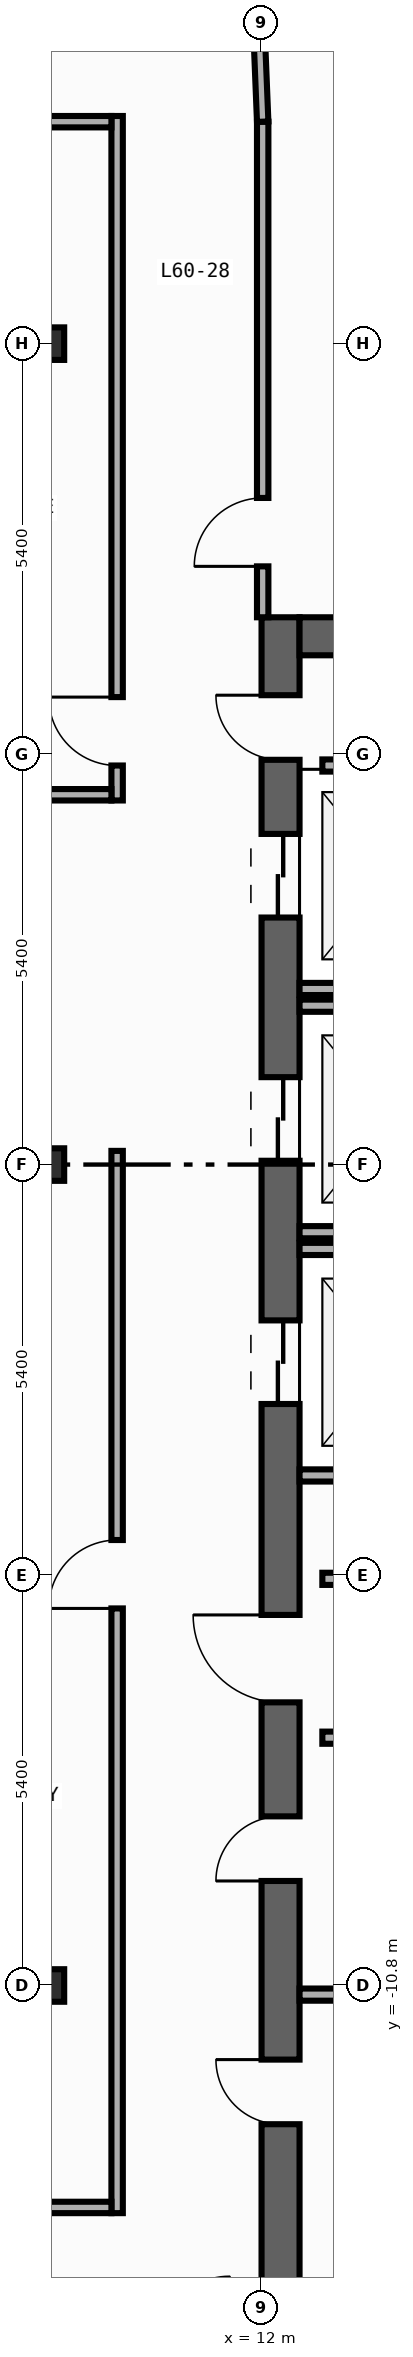
"""IFC4 building model, lengths in metres.
Left out: names, types, materials, properties, quantities, classifications, styles, units other than length and angle.
Written with IfcOpenShell. Run it as: python <this file> out.ifc"""

import sys

from ifc_helpers import new_model, si_unit, direction, frame, frame_2d, origin, origin_2d, place, context, subcontext, project, spatial, rectangle, i_section, extrude, element, fill, save


model = new_model("IFC4")
c1 = context("Model", 3, precision=1e-05, world=origin(), true_north=direction((0.0, 1.0)))
c2 = subcontext(c1, "Body", "Model", "MODEL_VIEW")
j1 = project(units=[si_unit("LENGTHUNIT", "METRE"), si_unit("PLANEANGLEUNIT", "RADIAN")], contexts=[c1])
p1 = place(None, origin())
s1 = spatial("IfcSite", under=j1, at=p1, CompositionType="ELEMENT")
p2 = place(p1, origin())
s2 = spatial("IfcBuilding", under=s1, at=p2, CompositionType="ELEMENT")
p3 = place(p2, frame((0.0, 0.0, 254.8)))
s3 = spatial("IfcBuildingStorey", under=s2, at=p3, CompositionType="ELEMENT", Elevation=254.8)
p4 = place(p3, frame((12.25, -19.8, 0.0), z_axis=(0.0, 0.0, 1.0), x_axis=(0.0, 1.0, 0.0)))
e1 = element("IfcWall", 1, at=p4, inside=s3, PredefinedType="SHEAR", context=c2, shape_type="SweptSolid", body=[
    extrude(rectangle(XDim=27.0, YDim=0.5, at=frame_2d((13.5, 0.0))), origin(), (0.0, 0.0, 1.0), 3.34),
])
p5 = place(p4, frame((23.05, 0.0, 0.0)))
e2 = element("IfcOpeningElement", 2, at=p5, cuts=e1, PredefinedType="OPENING", context=c2, shape_type="SweptSolid", body=[
    extrude(rectangle(XDim=1.1, YDim=2.2, at=frame_2d((0.55, 1.1))), frame((0.0, 0.26, 0.0), z_axis=(0.0, -1.0, 0.0), x_axis=(1.0, 0.0, 0.0)), (0.0, 0.0, 1.0), 0.52),
])
p6 = place(p4, frame((19.85, 0.0, 0.0)))
e3 = element("IfcOpeningElement", 3, at=p6, cuts=e1, PredefinedType="OPENING", context=c2, shape_type="SweptSolid", body=[
    extrude(rectangle(XDim=1.1, YDim=2.2, at=frame_2d((0.55, 1.1))), frame((0.0, 0.26, 0.0), z_axis=(0.0, -1.0, 0.0), x_axis=(1.0, 0.0, 0.0)), (0.0, 0.0, 1.0), 0.52),
])
p7 = place(p4, frame((16.65, 0.0, 0.0)))
e4 = element("IfcOpeningElement", 4, at=p7, cuts=e1, PredefinedType="OPENING", context=c2, shape_type="SweptSolid", body=[
    extrude(rectangle(XDim=1.1, YDim=2.2, at=frame_2d((0.55, 1.1))), frame((0.0, 0.26, 0.0), z_axis=(0.0, -1.0, 0.0), x_axis=(1.0, 0.0, 0.0)), (0.0, 0.0, 1.0), 0.52),
])
p8 = place(p4, frame((7.175, 0.0, 0.0)))
e5 = element("IfcOpeningElement", 5, at=p8, cuts=e1, PredefinedType="OPENING", context=c2, shape_type="SweptSolid", body=[
    extrude(rectangle(XDim=0.85, YDim=2.1, at=frame_2d((0.425, 1.05))), frame((0.0, 0.26, 0.0), z_axis=(0.0, -1.0, 0.0), x_axis=(1.0, 0.0, 0.0)), (0.0, 0.0, 1.0), 0.52),
])
p9 = place(p4, frame((10.375, 0.0, 0.0)))
e6 = element("IfcOpeningElement", 6, at=p9, cuts=e1, PredefinedType="OPENING", context=c2, shape_type="SweptSolid", body=[
    extrude(rectangle(XDim=0.85, YDim=2.1, at=frame_2d((0.425, 1.05))), frame((0.0, 0.26, 0.0), z_axis=(0.0, -1.0, 0.0), x_axis=(1.0, 0.0, 0.0)), (0.0, 0.0, 1.0), 0.52),
])
p10 = place(p4, frame((12.725, 0.0, 0.0)))
e7 = element("IfcOpeningElement", 7, at=p10, cuts=e1, PredefinedType="OPENING", context=c2, shape_type="SweptSolid", body=[
    extrude(rectangle(XDim=1.15, YDim=2.2, at=frame_2d((0.575, 1.1))), frame((0.0, 0.26, 0.0), z_axis=(0.0, -1.0, 0.0), x_axis=(1.0, 0.0, 0.0)), (0.0, 0.0, 1.0), 0.52),
])
p11 = place(p4, frame((25.125, 0.0, 0.0)))
e8 = element("IfcOpeningElement", 8, at=p11, cuts=e1, PredefinedType="OPENING", context=c2, shape_type="SweptSolid", body=[
    extrude(rectangle(XDim=0.85, YDim=2.1, at=frame_2d((0.425, 1.05))), frame((0.0, 0.26, 0.0), z_axis=(0.0, -1.0, 0.0), x_axis=(1.0, 0.0, 0.0)), (0.0, 0.0, 1.0), 0.52),
])
p12 = place(p3, frame((12.5, 6.95, 0.0), z_axis=(0.0, 0.0, 1.0), x_axis=(1.0, 0.0, 0.0)))
e9 = element("IfcWall", 9, at=p12, inside=s3, PredefinedType="SHEAR", context=c2, shape_type="SweptSolid", body=[
    extrude(rectangle(XDim=7.4, YDim=0.5, at=frame_2d((3.7, 0.0))), origin(), (0.0, 0.0, 1.0), 3.34),
])
for number, where, z_axis, x_axis in (
    (10, (9.2, -10.8, 0.0), (0.0, 0.0, 1.0), (1.0, 0.0, 0.0)),
    (11, (9.2, 0.0, 0.0), (0.0, 0.0, 1.0), (1.0, 0.0, 0.0)),
    (12, (9.2, 10.8, 0.0), (0.0, 0.0, 1.0), (1.0, 0.0, 0.0)),
):
    element("IfcColumn", number, at=place(p3, frame(where, z_axis=z_axis, x_axis=x_axis)), inside=s3, PredefinedType="COLUMN", context=c2, shape_type="SweptSolid", body=[
        extrude(i_section(OverallWidth=0.407, OverallDepth=0.428, WebThickness=0.02, FlangeThickness=0.035, FilletRadius=0.022, at=origin_2d()), origin(), (0.0, 0.0, 1.0), 3.6),
    ])
for number, where, z_axis, x_axis in (
    (13, (12.5, 2.31, 0.0), (0.0, 0.0, 1.0), (1.0, 0.0, 0.0)),
    (14, (12.5, -0.89, 0.0), (0.0, 0.0, 1.0), (1.0, 0.0, 0.0)),
    (15, (12.5, 2.09, 0.0), (0.0, 0.0, 1.0), (1.0, 0.0, 0.0)),
    (16, (12.5, -4.09, 0.0), (0.0, 0.0, 1.0), (1.0, 0.0, 0.0)),
    (17, (12.5, -1.11, 0.0), (0.0, 0.0, 1.0), (1.0, 0.0, 0.0)),
):
    element("IfcWall", number, at=place(p3, frame(where, z_axis=z_axis, x_axis=x_axis)), inside=s3, PredefinedType="STANDARD", context=c2, shape_type="SweptSolid", body=[
        extrude(rectangle(XDim=2.49, YDim=0.16, at=frame_2d((1.245, 0.0))), origin(), (0.0, 0.0, 1.0), 3.34),
    ])
for number, where, z_axis, x_axis in (
    (18, (12.8, -5.45, 0.0), (0.0, 0.0, 1.0), (1.0, 0.0, 0.0)),
    (19, (12.8, -7.54, 0.0), (0.0, 0.0, 1.0), (1.0, 0.0, 0.0)),
    (20, (12.8, 5.25, 0.0), (0.0, 0.0, 1.0), (1.0, 0.0, 0.0)),
):
    element("IfcWall", number, at=place(p3, frame(where, z_axis=z_axis, x_axis=x_axis)), inside=s3, PredefinedType="STANDARD", context=c2, shape_type="SweptSolid", body=[
        extrude(rectangle(XDim=2.6, YDim=0.16, at=frame_2d((1.3, 0.0))), origin(), (0.0, 0.0, 1.0), 3.34),
    ])
p13 = place(p3, frame((12.5, -10.92, 0.0), z_axis=(0.0, 0.0, 1.0), x_axis=(1.0, 0.0, 0.0)))
e21 = element("IfcWall", 21, at=p13, inside=s3, PredefinedType="PARTITIONING", context=c2, shape_type="SweptSolid", body=[
    extrude(rectangle(XDim=2.9, YDim=0.16, at=frame_2d((1.45, 0.0))), origin(), (0.0, 0.0, 1.0), 2.44),
])
p14 = place(p3, frame((12.015, 7.2, 0.0), z_axis=(0.0, 0.0, 1.0), x_axis=(0.0, 1.0, 0.0)))
e22 = element("IfcWall", 22, at=p14, inside=s3, PredefinedType="PARTITIONING", context=c2, shape_type="SweptSolid", body=[
    extrude(rectangle(XDim=6.52, YDim=0.15, at=frame_2d((3.26, 0.0))), origin(), (0.0, 0.0, 1.0), 3.34),
])
p15 = place(p14, frame((0.67, 0.0, 0.0)))
e23 = element("IfcOpeningElement", 23, at=p15, cuts=e22, PredefinedType="OPENING", context=c2, shape_type="SweptSolid", body=[
    extrude(rectangle(XDim=0.9, YDim=2.15, at=frame_2d((0.45, 1.075))), frame((0.0, 0.085, 0.0), z_axis=(0.0, -1.0, 0.0), x_axis=(1.0, 0.0, 0.0)), (0.0, 0.0, 1.0), 0.17),
])
p16 = place(p3, frame((10.1, 4.79, 0.0), z_axis=(0.0, 0.0, 1.0), x_axis=(0.0, 1.0, 0.0)))
e24 = element("IfcWall", 24, at=p16, inside=s3, PredefinedType="PARTITIONING", context=c2, shape_type="SweptSolid", body=[
    extrude(rectangle(XDim=9.005, YDim=0.15, at=frame_2d((4.502, 0.0))), origin(), (0.0, 0.0, 1.0), 3.34),
])
p17 = place(p16, frame((0.46, 0.0, 0.0)))
e25 = element("IfcOpeningElement", 25, at=p17, cuts=e24, PredefinedType="OPENING", context=c2, shape_type="SweptSolid", body=[
    extrude(rectangle(XDim=0.9, YDim=2.15, at=frame_2d((0.45, 1.075))), frame((0.0, 0.085, 0.0), z_axis=(0.0, -1.0, 0.0), x_axis=(1.0, 0.0, 0.0)), (0.0, 0.0, 1.0), 0.17),
])
p18 = place(p3, frame((10.1, -13.795, 0.0), z_axis=(0.0, 0.0, 1.0), x_axis=(0.0, 1.0, 0.0)))
e26 = element("IfcWall", 26, at=p18, inside=s3, PredefinedType="PARTITIONING", context=c2, shape_type="SweptSolid", body=[
    extrude(rectangle(XDim=13.975, YDim=0.15, at=frame_2d((6.987, 0.0))), origin(), (0.0, 0.0, 1.0), 3.34),
])
p19 = place(p18, frame((7.956, 0.0, 0.0)))
e27 = element("IfcOpeningElement", 27, at=p19, cuts=e26, PredefinedType="OPENING", context=c2, shape_type="SweptSolid", body=[
    extrude(rectangle(XDim=0.9, YDim=2.15, at=frame_2d((0.45, 1.075))), frame((0.0, 0.085, 0.0), z_axis=(0.0, -1.0, 0.0), x_axis=(1.0, 0.0, 0.0)), (0.0, 0.0, 1.0), 0.17),
])
p20 = place(p3, frame((4.97, 4.865, 0.0), z_axis=(0.0, 0.0, 1.0), x_axis=(1.0, 0.0, 0.0)))
e28 = element("IfcWall", 28, at=p20, inside=s3, PredefinedType="PARTITIONING", context=c2, shape_type="SweptSolid", body=[
    extrude(rectangle(XDim=5.055, YDim=0.15, at=frame_2d((2.527, 0.0))), origin(), (0.0, 0.0, 1.0), 3.34),
])
p21 = place(p20, frame((0.46, 0.0, 0.0)))
e29 = element("IfcOpeningElement", 29, at=p21, cuts=e28, PredefinedType="OPENING", context=c2, shape_type="SweptSolid", body=[
    extrude(rectangle(XDim=0.9, YDim=2.15, at=frame_2d((0.45, 1.075))), frame((0.0, 0.085, 0.0), z_axis=(0.0, -1.0, 0.0), x_axis=(1.0, 0.0, 0.0)), (0.0, 0.0, 1.0), 0.17),
])
p22 = place(p3, frame((12.015, 13.72, 0.0), z_axis=(0.0, 0.0, 1.0), x_axis=(-0.040046877756, 0.99919780203, 0.0)))
e30 = element("IfcWall", 30, at=p22, inside=s3, PredefinedType="PARTITIONING", context=c2, shape_type="SweptSolid", body=[
    extrude(rectangle(XDim=1.731, YDim=0.15, at=frame_2d((0.866, 0.0))), origin(), (0.0, 0.0, 1.0), 3.34),
])
p23 = place(p3, frame((4.97, 13.72, 0.0), z_axis=(0.0, 0.0, 1.0), x_axis=(1.0, 0.0, 0.0)))
e31 = element("IfcWall", 31, at=p23, inside=s3, PredefinedType="PARTITIONING", context=c2, shape_type="SweptSolid", body=[
    extrude(rectangle(XDim=5.055, YDim=0.15, at=frame_2d((2.527, 0.0))), origin(), (0.0, 0.0, 1.0), 3.34),
])
p24 = place(p23, frame((0.46, 0.0, 0.0)))
e32 = element("IfcOpeningElement", 32, at=p24, cuts=e31, PredefinedType="OPENING", context=c2, shape_type="SweptSolid", body=[
    extrude(rectangle(XDim=0.9, YDim=2.15, at=frame_2d((0.45, 1.075))), frame((0.0, 0.085, 0.0), z_axis=(0.0, -1.0, 0.0), x_axis=(1.0, 0.0, 0.0)), (0.0, 0.0, 1.0), 0.17),
])
p25 = place(p3, frame((5.14, -13.72, 0.0), z_axis=(0.0, 0.0, 1.0), x_axis=(1.0, 0.0, 0.0)))
e33 = element("IfcWall", 33, at=p25, inside=s3, PredefinedType="PARTITIONING", context=c2, shape_type="SweptSolid", body=[
    extrude(rectangle(XDim=4.885, YDim=0.15, at=frame_2d((2.442, 0.0))), origin(), (0.0, 0.0, 1.0), 3.34),
])
p26 = place(p25, frame((0.46, 0.0, 0.0)))
e34 = element("IfcOpeningElement", 34, at=p26, cuts=e33, PredefinedType="OPENING", context=c2, shape_type="SweptSolid", body=[
    extrude(rectangle(XDim=0.9, YDim=2.15, at=frame_2d((0.45, 1.075))), frame((0.0, 0.085, 0.0), z_axis=(0.0, -1.0, 0.0), x_axis=(1.0, 0.0, 0.0)), (0.0, 0.0, 1.0), 0.17),
])
p27 = place(p5, origin())
e35 = element("IfcDoor", 35, at=p27, inside=s3, OperationType="DOUBLE_DOOR_SLIDING", PredefinedType="DOOR", context=c2, shape_type="SweptSolid", body=[
    extrude(rectangle(XDim=1.1, YDim=2.2, at=frame_2d((0.55, 1.1))), frame((0.0, 0.025, 0.0), z_axis=(0.0, -1.0, 0.0), x_axis=(1.0, 0.0, 0.0)), (0.0, 0.0, 1.0), 0.05),
])
fill(e2, e35)
p28 = place(p6, origin())
e36 = element("IfcDoor", 36, at=p28, inside=s3, OperationType="DOUBLE_DOOR_SLIDING", PredefinedType="DOOR", context=c2, shape_type="SweptSolid", body=[
    extrude(rectangle(XDim=1.1, YDim=2.2, at=frame_2d((0.55, 1.1))), frame((0.0, 0.025, 0.0), z_axis=(0.0, -1.0, 0.0), x_axis=(1.0, 0.0, 0.0)), (0.0, 0.0, 1.0), 0.05),
])
fill(e3, e36)
p29 = place(p7, origin())
e37 = element("IfcDoor", 37, at=p29, inside=s3, OperationType="DOUBLE_DOOR_SLIDING", PredefinedType="DOOR", context=c2, shape_type="SweptSolid", body=[
    extrude(rectangle(XDim=1.1, YDim=2.2, at=frame_2d((0.55, 1.1))), frame((0.0, 0.025, 0.0), z_axis=(0.0, -1.0, 0.0), x_axis=(1.0, 0.0, 0.0)), (0.0, 0.0, 1.0), 0.05),
])
fill(e4, e37)
p30 = place(p8, origin())
e38 = element("IfcDoor", 38, at=p30, inside=s3, OperationType="SINGLE_SWING_RIGHT", PredefinedType="DOOR", context=c2, shape_type="SweptSolid", body=[
    extrude(rectangle(XDim=0.85, YDim=2.1, at=frame_2d((0.425, 1.05))), frame((0.0, 0.025, 0.0), z_axis=(0.0, -1.0, 0.0), x_axis=(1.0, 0.0, 0.0)), (0.0, 0.0, 1.0), 0.05),
])
fill(e5, e38)
p31 = place(p9, origin())
e39 = element("IfcDoor", 39, at=p31, inside=s3, OperationType="SINGLE_SWING_LEFT", PredefinedType="DOOR", context=c2, shape_type="SweptSolid", body=[
    extrude(rectangle(XDim=0.85, YDim=2.1, at=frame_2d((0.425, 1.05))), frame((0.0, 0.025, 0.0), z_axis=(0.0, -1.0, 0.0), x_axis=(1.0, 0.0, 0.0)), (0.0, 0.0, 1.0), 0.05),
])
fill(e6, e39)
p32 = place(p10, origin())
e40 = element("IfcDoor", 40, at=p32, inside=s3, OperationType="SINGLE_SWING_RIGHT", PredefinedType="DOOR", context=c2, shape_type="SweptSolid", body=[
    extrude(rectangle(XDim=1.15, YDim=2.2, at=frame_2d((0.575, 1.1))), frame((0.0, 0.025, 0.0), z_axis=(0.0, -1.0, 0.0), x_axis=(1.0, 0.0, 0.0)), (0.0, 0.0, 1.0), 0.05),
])
fill(e7, e40)
p33 = place(p11, origin())
e41 = element("IfcDoor", 41, at=p33, inside=s3, OperationType="SINGLE_SWING_RIGHT", PredefinedType="DOOR", context=c2, shape_type="SweptSolid", body=[
    extrude(rectangle(XDim=0.85, YDim=2.1, at=frame_2d((0.425, 1.05))), frame((0.0, 0.025, 0.0), z_axis=(0.0, -1.0, 0.0), x_axis=(1.0, 0.0, 0.0)), (0.0, 0.0, 1.0), 0.05),
])
fill(e8, e41)
p34 = place(p15, origin())
e42 = element("IfcDoor", 42, at=p34, inside=s3, OperationType="SINGLE_SWING_LEFT", PredefinedType="DOOR", context=c2, shape_type="SweptSolid", body=[
    extrude(rectangle(XDim=0.9, YDim=2.15, at=frame_2d((0.45, 1.075))), frame((0.0, 0.025, 0.0), z_axis=(0.0, -1.0, 0.0), x_axis=(1.0, 0.0, 0.0)), (0.0, 0.0, 1.0), 0.05),
])
fill(e23, e42)
p35 = place(p17, origin())
e43 = element("IfcDoor", 43, at=p35, inside=s3, OperationType="SINGLE_SWING_RIGHT", PredefinedType="DOOR", context=c2, shape_type="SweptSolid", body=[
    extrude(rectangle(XDim=0.9, YDim=2.15, at=frame_2d((0.45, 1.075))), frame((0.0, 0.025, 0.0), z_axis=(0.0, -1.0, 0.0), x_axis=(1.0, 0.0, 0.0)), (0.0, 0.0, 1.0), 0.05),
])
fill(e25, e43)
p36 = place(p19, origin())
e44 = element("IfcDoor", 44, at=p36, inside=s3, OperationType="SINGLE_SWING_LEFT", PredefinedType="DOOR", context=c2, shape_type="SweptSolid", body=[
    extrude(rectangle(XDim=0.9, YDim=2.15, at=frame_2d((0.45, 1.075))), frame((0.0, 0.025, 0.0), z_axis=(0.0, -1.0, 0.0), x_axis=(1.0, 0.0, 0.0)), (0.0, 0.0, 1.0), 0.05),
])
fill(e27, e44)
save(model, sys.argv[1])
